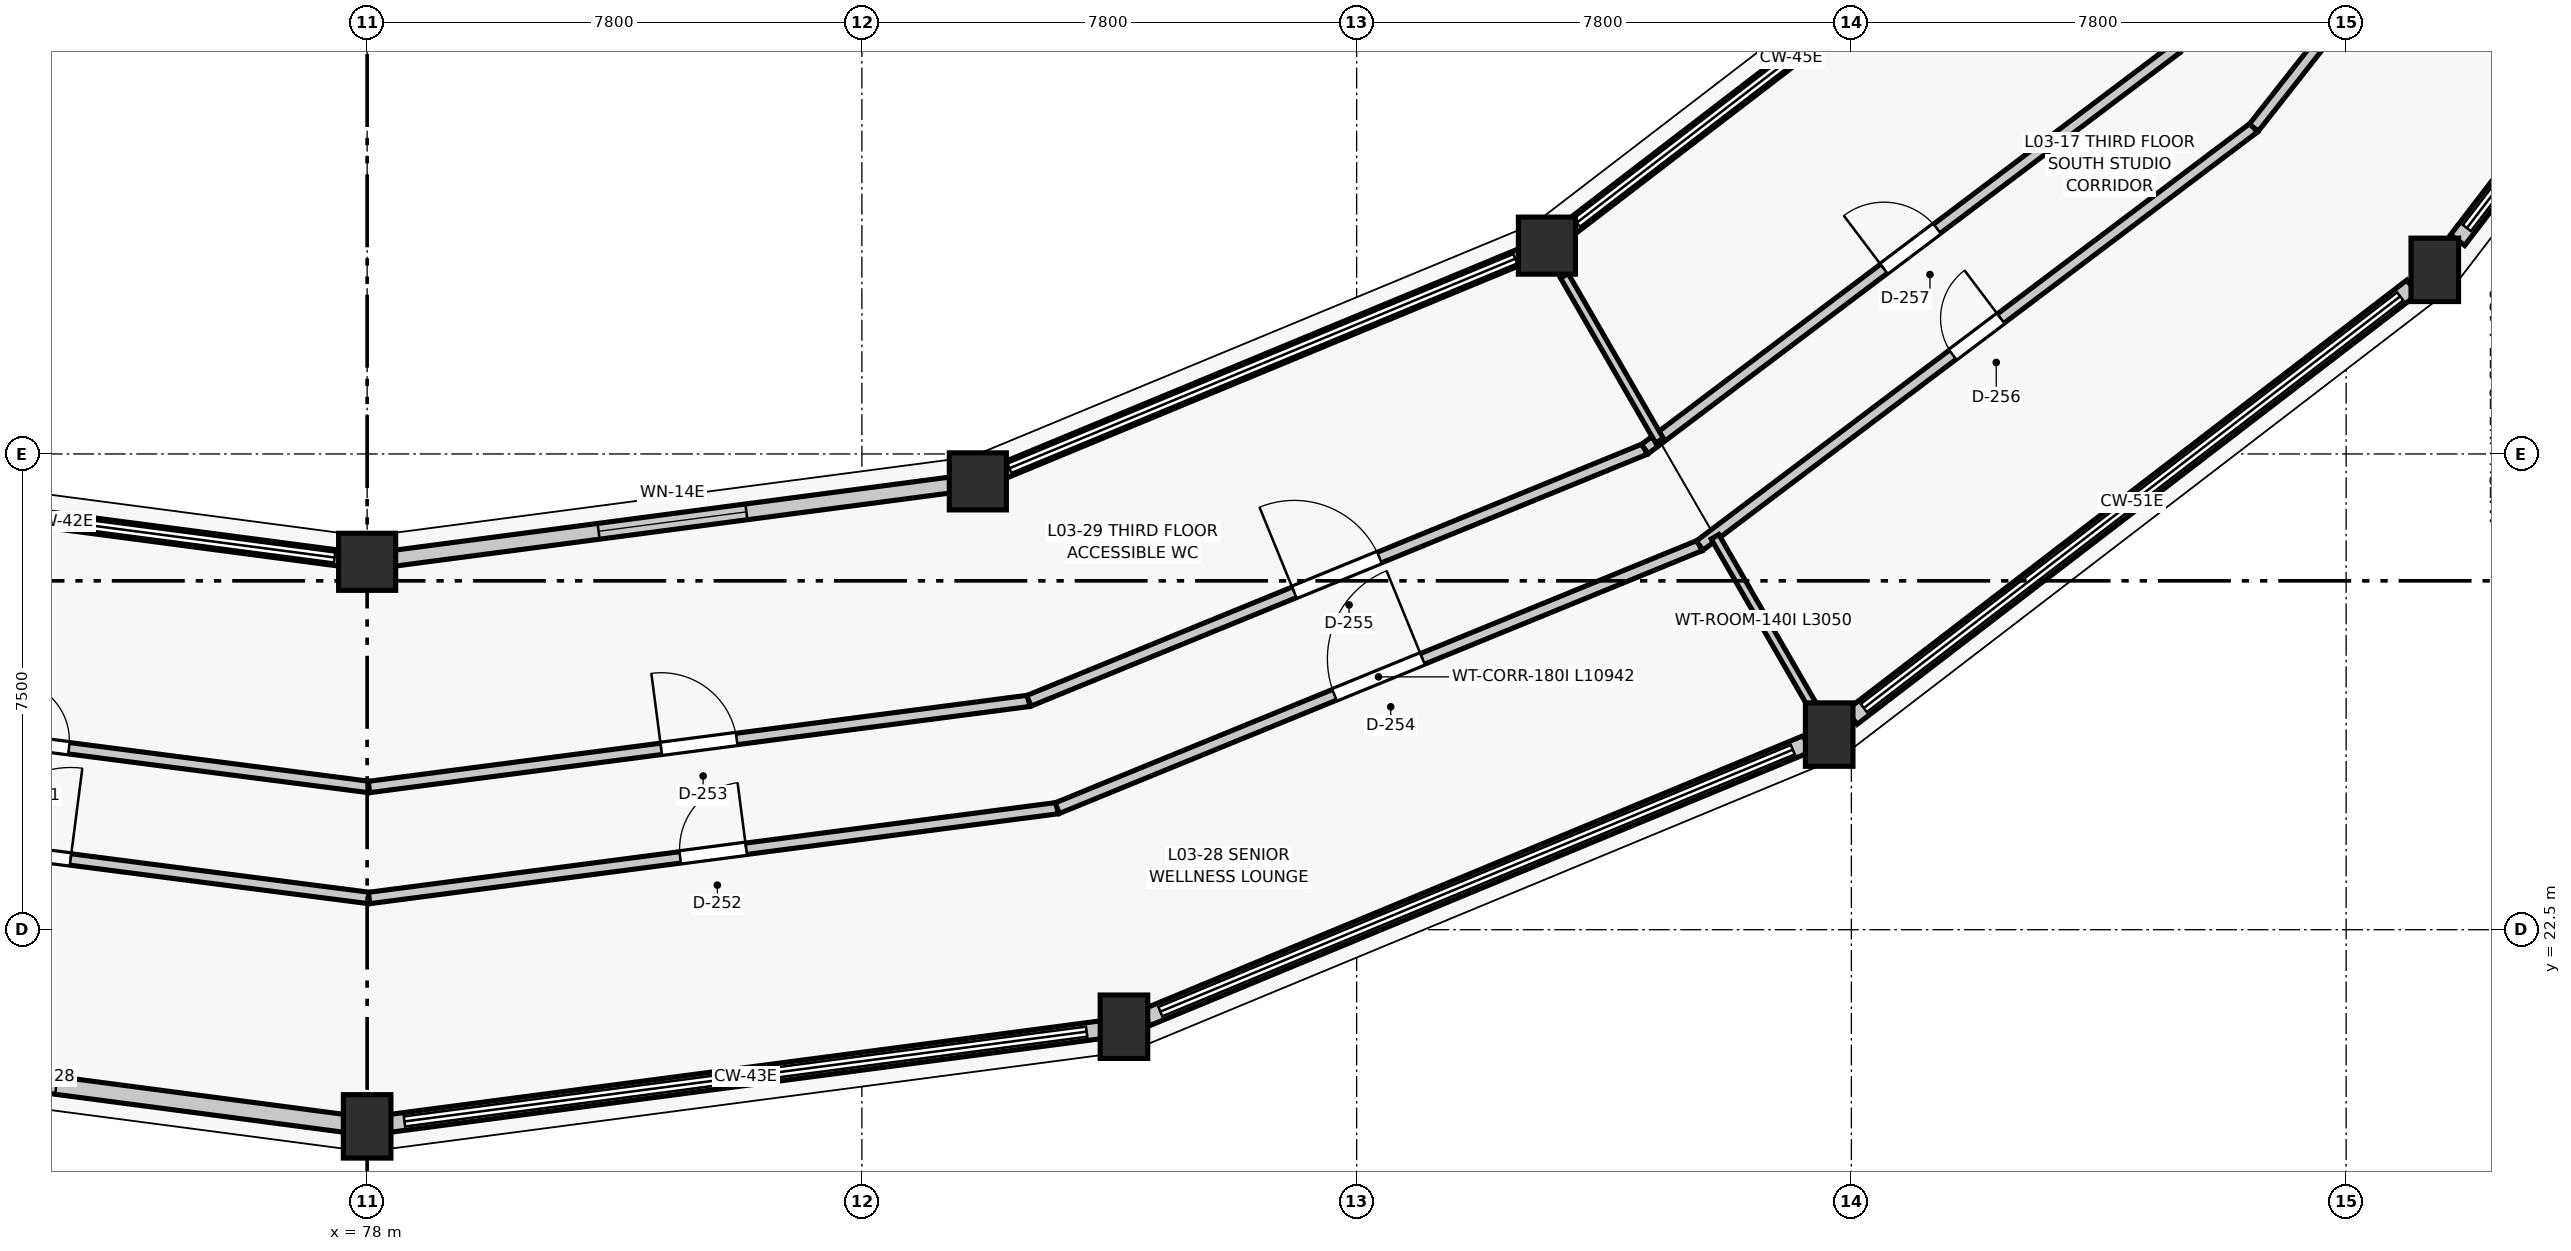
"""IFC4 building model, lengths in metres.
Left out: names, types, materials, properties, quantities, classifications, styles, units other than length and angle.
Written with IfcOpenShell. Run it as: python <this file> out.ifc"""

import sys

from ifc_helpers import new_model, si_unit, direction, frame, frame_2d, origin, origin_2d, place, context, subcontext, project, spatial, rectangle, circle, extrude, element, fill, save


model = new_model("IFC4")
c1 = context("Model", 3, precision=1e-05, world=origin(), true_north=direction((0.0, 1.0)))
c2 = subcontext(c1, "Body", "Model", "MODEL_VIEW")
j1 = project(units=[si_unit("LENGTHUNIT", "METRE"), si_unit("PLANEANGLEUNIT", "RADIAN")], contexts=[c1])
p1 = place(None, origin())
s1 = spatial("IfcSite", under=j1, at=p1, CompositionType="ELEMENT")
p2 = place(p1, origin())
s2 = spatial("IfcBuilding", under=s1, at=p2, CompositionType="ELEMENT")
p3 = place(p2, frame((0.0, 0.0, 12.6)))
s3 = spatial("IfcBuildingStorey", under=s2, at=p3, CompositionType="ELEMENT", Elevation=12.6)
p4 = place(p3, frame((87.628, 29.568, 0.0), z_axis=(0.0, 0.0, 1.0), x_axis=(1.0, 0.0, 0.0)))
e1 = element("IfcColumn", 1, at=p4, inside=s3, PredefinedType="COLUMN", context=c2, shape_type="SweptSolid", body=[
    extrude(circle(Radius=0.45, at=origin_2d()), origin(), (0.0, 0.0, 1.0), 3.9),
])
for number, where, z_axis, x_axis in (
    (2, (89.932, 20.971, 0.0), (0.0, 0.0, 1.0), (1.0, 0.0, 0.0)),
    (3, (78.0, 19.4, 0.0), (0.0, 0.0, 1.0), (1.0, 0.0, 0.0)),
):
    element("IfcColumn", number, at=place(p3, frame(where, z_axis=z_axis, x_axis=x_axis)), inside=s3, PredefinedType="COLUMN", context=c2, shape_type="SweptSolid", body=[
        extrude(rectangle(XDim=0.75, YDim=1.0, at=origin_2d()), origin(), (0.0, 0.0, 1.0), 3.9),
    ])
p5 = place(p3, frame((78.0, 28.3, 0.0), z_axis=(0.0, 0.0, 1.0), x_axis=(1.0, 0.0, 0.0)))
e4 = element("IfcColumn", 4, at=p5, inside=s3, PredefinedType="COLUMN", context=c2, shape_type="SweptSolid", body=[
    extrude(circle(Radius=0.45, at=origin_2d()), origin(), (0.0, 0.0, 1.0), 3.9),
])
p6 = place(p3, frame((101.05, 25.576, 0.0), z_axis=(0.0, 0.0, 1.0), x_axis=(1.0, 0.0, 0.0)))
e5 = element("IfcColumn", 5, at=p6, inside=s3, PredefinedType="COLUMN", context=c2, shape_type="SweptSolid", body=[
    extrude(rectangle(XDim=0.75, YDim=1.0, at=origin_2d()), origin(), (0.0, 0.0, 1.0), 3.9),
])
p7 = place(p3, frame((96.6, 33.284, 0.0), z_axis=(0.0, 0.0, 1.0), x_axis=(1.0, 0.0, 0.0)))
e6 = element("IfcColumn", 6, at=p7, inside=s3, PredefinedType="COLUMN", context=c2, shape_type="SweptSolid", body=[
    extrude(circle(Radius=0.45, at=origin_2d()), origin(), (0.0, 0.0, 1.0), 3.9),
])
p8 = place(p3, frame((110.598, 32.902, 0.0), z_axis=(0.0, 0.0, 1.0), x_axis=(1.0, 0.0, 0.0)))
e7 = element("IfcColumn", 7, at=p8, inside=s3, PredefinedType="COLUMN", context=c2, shape_type="SweptSolid", body=[
    extrude(rectangle(XDim=0.75, YDim=1.0, at=origin_2d()), origin(), (0.0, 0.0, 1.0), 3.9),
])
p9 = place(p3, frame((77.65, 19.446, 0.0), z_axis=(0.0, 0.0, 1.0), x_axis=(-0.991443215359, 0.130538694334, 0.0)))
e8 = element("IfcWall", 8, at=p9, inside=s3, PredefinedType="STANDARD", context=c2, shape_type="SweptSolid", body=[
    extrude(rectangle(XDim=11.328, YDim=0.28, at=frame_2d((5.664, 0.0))), origin(), (0.0, 0.0, 1.0), 2.805),
])
p10 = place(p9, frame((4.589, 0.0, 0.85)))
e9 = element("IfcOpeningElement", 9, at=p10, cuts=e8, PredefinedType="OPENING", context=c2, shape_type="SweptSolid", body=[
    extrude(rectangle(XDim=2.15, YDim=1.55, at=frame_2d((1.075, 0.775))), frame((0.0, 0.15, 0.0), z_axis=(0.0, -1.0, 0.0), x_axis=(1.0, 0.0, 0.0)), (0.0, 0.0, 1.0), 0.3),
])
p11 = place(p3, frame((68.647, 29.531, 0.0), z_axis=(0.0, 0.0, 1.0), x_axis=(0.991441766434, -0.130549698469, 0.0)))
e10 = element("IfcWall", 10, at=p11, inside=s3, PredefinedType="STANDARD", context=c2, shape_type="SweptSolid", body=[
    extrude(rectangle(XDim=9.156, YDim=0.25, at=frame_2d((4.578, 0.0))), origin(), (0.0, 0.0, 1.0), 0.82),
])
p12 = place(p3, frame((89.581, 20.925, 0.0), z_axis=(0.0, 0.0, 1.0), x_axis=(-0.991443215359, -0.130538694334, 0.0)))
e11 = element("IfcWall", 11, at=p12, inside=s3, PredefinedType="STANDARD", context=c2, shape_type="SweptSolid", body=[
    extrude(rectangle(XDim=11.328, YDim=0.28, at=frame_2d((5.664, 0.0))), origin(), (0.0, 0.0, 1.0), 0.82),
])
p13 = place(p3, frame((78.275, 28.336, 0.0), z_axis=(0.0, 0.0, 1.0), x_axis=(0.991441766434, 0.130549698469, 0.0)))
e12 = element("IfcWall", 12, at=p13, inside=s3, PredefinedType="STANDARD", context=c2, shape_type="SweptSolid", body=[
    extrude(rectangle(XDim=9.156, YDim=0.25, at=frame_2d((4.578, 0.0))), origin(), (0.0, 0.0, 1.0), 2.889),
])
p14 = place(p13, frame((3.403, 0.0, 0.85)))
e13 = element("IfcOpeningElement", 13, at=p14, cuts=e12, PredefinedType="OPENING", context=c2, shape_type="SweptSolid", body=[
    extrude(rectangle(XDim=2.35, YDim=1.55, at=frame_2d((1.175, 0.775))), frame((0.0, 0.135, 0.0), z_axis=(0.0, -1.0, 0.0), x_axis=(1.0, 0.0, 0.0)), (0.0, 0.0, 1.0), 0.27),
])
p15 = place(p3, frame((100.698, 25.43, 0.0), z_axis=(0.0, 0.0, 1.0), x_axis=(-0.923883530636, -0.382673779896, 0.0)))
e14 = element("IfcWall", 14, at=p15, inside=s3, PredefinedType="STANDARD", context=c2, shape_type="SweptSolid", body=[
    extrude(rectangle(XDim=11.272, YDim=0.28, at=frame_2d((5.636, 0.0))), origin(), (0.0, 0.0, 1.0), 0.82),
])
p16 = place(p3, frame((87.905, 29.682, 0.0), z_axis=(0.0, 0.0, 1.0), x_axis=(0.923880324771, 0.382681519675, 0.0)))
e15 = element("IfcWall", 15, at=p16, inside=s3, PredefinedType="STANDARD", context=c2, shape_type="SweptSolid", body=[
    extrude(rectangle(XDim=9.112, YDim=0.25, at=frame_2d((4.556, 0.0))), origin(), (0.0, 0.0, 1.0), 0.82),
])
p17 = place(p3, frame((110.242, 32.63, 0.0), z_axis=(0.0, 0.0, 1.0), x_axis=(-0.793342066679, -0.608776120785, 0.0)))
e16 = element("IfcWall", 16, at=p17, inside=s3, PredefinedType="STANDARD", context=c2, shape_type="SweptSolid", body=[
    extrude(rectangle(XDim=11.139, YDim=0.28, at=frame_2d((5.57, 0.0))), origin(), (0.0, 0.0, 1.0), 0.82),
])
p18 = place(p3, frame((96.88, 33.499, 0.0), z_axis=(0.0, 0.0, 1.0), x_axis=(0.793347085527, 0.608769580289, 0.0)))
e17 = element("IfcWall", 17, at=p18, inside=s3, PredefinedType="STANDARD", context=c2, shape_type="SweptSolid", body=[
    extrude(rectangle(XDim=9.005, YDim=0.25, at=frame_2d((4.502, 0.0))), origin(), (0.0, 0.0, 1.0), 0.82),
])
p19 = place(p3, frame((117.564, 41.981, 0.0), z_axis=(0.0, 0.0, 1.0), x_axis=(-0.608753590889, -0.79335935463, 0.0)))
e18 = element("IfcWall", 18, at=p19, inside=s3, PredefinedType="STANDARD", context=c2, shape_type="SweptSolid", body=[
    extrude(rectangle(XDim=10.852, YDim=0.28, at=frame_2d((5.426, 0.0))), origin(), (0.0, 0.0, 1.0), 0.82),
])
p20 = place(p3, frame((67.179, 24.4, 0.0), z_axis=(0.0, 0.0, 1.0), x_axis=(0.991775673997, -0.12798832942, 0.0)))
e19 = element("IfcWall", 19, at=p20, inside=s3, PredefinedType="PARTITIONING", context=c2, shape_type="SweptSolid", body=[
    extrude(rectangle(XDim=10.942, YDim=0.18, at=frame_2d((5.471, 0.0))), origin(), (0.0, 0.0, 1.0), 3.595),
])
p21 = place(p20, frame((4.746, 0.0, 0.0)))
e20 = element("IfcOpeningElement", 20, at=p21, cuts=e19, PredefinedType="OPENING", context=c2, shape_type="SweptSolid", body=[
    extrude(rectangle(XDim=1.45, YDim=2.2, at=frame_2d((0.725, 1.1))), frame((0.0, 0.1, 0.0), z_axis=(0.0, -1.0, 0.0), x_axis=(1.0, 0.0, 0.0)), (0.0, 0.0, 1.0), 0.2),
])
p22 = place(p3, frame((67.625, 26.093, 0.0), z_axis=(0.0, 0.0, 1.0), x_axis=(0.991771863005, -0.128017857155, 0.0)))
e21 = element("IfcWall", 21, at=p22, inside=s3, PredefinedType="PARTITIONING", context=c2, shape_type="SweptSolid", body=[
    extrude(rectangle(XDim=10.491, YDim=0.18, at=frame_2d((5.246, 0.0))), origin(), (0.0, 0.0, 1.0), 3.595),
])
p23 = place(p22, frame((4.771, 0.0, 0.0)))
e22 = element("IfcOpeningElement", 22, at=p23, cuts=e21, PredefinedType="OPENING", context=c2, shape_type="SweptSolid", body=[
    extrude(rectangle(XDim=0.95, YDim=2.1, at=frame_2d((0.475, 1.05))), frame((0.0, 0.1, 0.0), z_axis=(0.0, -1.0, 0.0), x_axis=(1.0, 0.0, 0.0)), (0.0, 0.0, 1.0), 0.2),
])
p24 = place(p3, frame((78.031, 23.0, 0.0), z_axis=(0.0, 0.0, 1.0), x_axis=(0.991587217042, 0.129440298973, 0.0)))
e23 = element("IfcWall", 23, at=p24, inside=s3, PredefinedType="PARTITIONING", context=c2, shape_type="SweptSolid", body=[
    extrude(rectangle(XDim=10.941, YDim=0.18, at=frame_2d((5.471, 0.0))), origin(), (0.0, 0.0, 1.0), 3.595),
])
p25 = place(p24, frame((4.946, 0.0, 0.0)))
e24 = element("IfcOpeningElement", 24, at=p25, cuts=e23, PredefinedType="OPENING", context=c2, shape_type="SweptSolid", body=[
    extrude(rectangle(XDim=1.05, YDim=2.1, at=frame_2d((0.525, 1.05))), frame((0.0, 0.1, 0.0), z_axis=(0.0, -1.0, 0.0), x_axis=(1.0, 0.0, 0.0)), (0.0, 0.0, 1.0), 0.2),
])
p26 = place(p3, frame((78.03, 24.75, 0.0), z_axis=(0.0, 0.0, 1.0), x_axis=(0.991587949115, 0.129434690753, 0.0)))
e25 = element("IfcWall", 25, at=p26, inside=s3, PredefinedType="PARTITIONING", context=c2, shape_type="SweptSolid", body=[
    extrude(rectangle(XDim=10.491, YDim=0.18, at=frame_2d((5.246, 0.0))), origin(), (0.0, 0.0, 1.0), 3.595),
])
p27 = place(p26, frame((4.646, 0.0, 0.0)))
e26 = element("IfcOpeningElement", 26, at=p27, cuts=e25, PredefinedType="OPENING", context=c2, shape_type="SweptSolid", body=[
    extrude(rectangle(XDim=1.2, YDim=2.15, at=frame_2d((0.6, 1.075))), frame((0.0, 0.1, 0.0), z_axis=(0.0, -1.0, 0.0), x_axis=(1.0, 0.0, 0.0)), (0.0, 0.0, 1.0), 0.2),
])
p28 = place(p3, frame((88.88, 24.416, 0.0), z_axis=(0.0, 0.0, 1.0), x_axis=(0.925676277966, 0.378316571685, 0.0)))
e27 = element("IfcWall", 27, at=p28, inside=s3, PredefinedType="PARTITIONING", context=c2, shape_type="SweptSolid", body=[
    extrude(rectangle(XDim=10.942, YDim=0.18, at=frame_2d((5.471, 0.0))), origin(), (0.0, 0.0, 1.0), 3.595),
])
p29 = place(p28, frame((4.721, 0.0, 0.0)))
e28 = element("IfcOpeningElement", 28, at=p29, cuts=e27, PredefinedType="OPENING", context=c2, shape_type="SweptSolid", body=[
    extrude(rectangle(XDim=1.5, YDim=2.15, at=frame_2d((0.75, 1.075))), frame((0.0, 0.1, 0.0), z_axis=(0.0, -1.0, 0.0), x_axis=(1.0, 0.0, 0.0)), (0.0, 0.0, 1.0), 0.2),
])
p30 = place(p3, frame((88.432, 26.108, 0.0), z_axis=(0.0, 0.0, 1.0), x_axis=(0.925672571616, 0.378325640364, 0.0)))
e29 = element("IfcWall", 29, at=p30, inside=s3, PredefinedType="PARTITIONING", context=c2, shape_type="SweptSolid", body=[
    extrude(rectangle(XDim=10.491, YDim=0.18, at=frame_2d((5.246, 0.0))), origin(), (0.0, 0.0, 1.0), 3.595),
])
p31 = place(p30, frame((4.521, 0.0, 0.0)))
e30 = element("IfcOpeningElement", 30, at=p31, cuts=e29, PredefinedType="OPENING", context=c2, shape_type="SweptSolid", body=[
    extrude(rectangle(XDim=1.45, YDim=2.2, at=frame_2d((0.725, 1.1))), frame((0.0, 0.1, 0.0), z_axis=(0.0, -1.0, 0.0), x_axis=(1.0, 0.0, 0.0)), (0.0, 0.0, 1.0), 0.2),
])
p32 = place(p3, frame((99.009, 28.556, 0.0), z_axis=(0.0, 0.0, 1.0), x_axis=(0.798409350031, 0.602115030358, 0.0)))
e31 = element("IfcWall", 31, at=p32, inside=s3, PredefinedType="PARTITIONING", context=c2, shape_type="SweptSolid", body=[
    extrude(rectangle(XDim=10.941, YDim=0.18, at=frame_2d((5.471, 0.0))), origin(), (0.0, 0.0, 1.0), 3.595),
])
p33 = place(p32, frame((4.996, 0.0, 0.0)))
e32 = element("IfcOpeningElement", 32, at=p33, cuts=e31, PredefinedType="OPENING", context=c2, shape_type="SweptSolid", body=[
    extrude(rectangle(XDim=0.95, YDim=2.1, at=frame_2d((0.475, 1.05))), frame((0.0, 0.1, 0.0), z_axis=(0.0, -1.0, 0.0), x_axis=(1.0, 0.0, 0.0)), (0.0, 0.0, 1.0), 0.2),
])
p34 = place(p3, frame((98.144, 30.077, 0.0), z_axis=(0.0, 0.0, 1.0), x_axis=(0.798419431093, 0.602101662557, 0.0)))
e33 = element("IfcWall", 33, at=p34, inside=s3, PredefinedType="PARTITIONING", context=c2, shape_type="SweptSolid", body=[
    extrude(rectangle(XDim=10.491, YDim=0.18, at=frame_2d((5.246, 0.0))), origin(), (0.0, 0.0, 1.0), 3.595),
])
p35 = place(p34, frame((4.72, 0.0, 0.0)))
e34 = element("IfcOpeningElement", 34, at=p35, cuts=e33, PredefinedType="OPENING", context=c2, shape_type="SweptSolid", body=[
    extrude(rectangle(XDim=1.05, YDim=2.1, at=frame_2d((0.525, 1.05))), frame((0.0, 0.1, 0.0), z_axis=(0.0, -1.0, 0.0), x_axis=(1.0, 0.0, 0.0)), (0.0, 0.0, 1.0), 0.2),
])
p36 = place(p3, frame((107.744, 35.144, 0.0), z_axis=(0.0, 0.0, 1.0), x_axis=(0.618252095573, 0.785979863813, 0.0)))
e35 = element("IfcWall", 35, at=p36, inside=s3, PredefinedType="PARTITIONING", context=c2, shape_type="SweptSolid", body=[
    extrude(rectangle(XDim=10.942, YDim=0.18, at=frame_2d((5.471, 0.0))), origin(), (0.0, 0.0, 1.0), 3.595),
])
p37 = place(p36, frame((4.871, 0.0, 0.0)))
e36 = element("IfcOpeningElement", 36, at=p37, cuts=e35, PredefinedType="OPENING", context=c2, shape_type="SweptSolid", body=[
    extrude(rectangle(XDim=1.2, YDim=2.15, at=frame_2d((0.6, 1.075))), frame((0.0, 0.1, 0.0), z_axis=(0.0, -1.0, 0.0), x_axis=(1.0, 0.0, 0.0)), (0.0, 0.0, 1.0), 0.2),
])
p38 = place(p3, frame((99.25, 28.694, 0.0), z_axis=(0.0, 0.0, 1.0), x_axis=(0.499978833458, -0.866037623948, 0.0)))
e37 = element("IfcWall", 37, at=p38, inside=s3, PredefinedType="PARTITIONING", context=c2, shape_type="SweptSolid", body=[
    extrude(rectangle(XDim=3.05, YDim=0.14, at=frame_2d((1.525, 0.0))), origin(), (0.0, 0.0, 1.0), 2.957),
])
p39 = place(p3, frame((96.875, 32.808, 0.0), z_axis=(0.0, 0.0, 1.0), x_axis=(0.499990139034, -0.866031096941, 0.0)))
e38 = element("IfcWall", 38, at=p39, inside=s3, PredefinedType="PARTITIONING", context=c2, shape_type="SweptSolid", body=[
    extrude(rectangle(XDim=3.0, YDim=0.14, at=frame_2d((1.5, 0.0))), origin(), (0.0, 0.0, 1.0), 2.957),
])
p40 = place(p10, origin())
e39 = element("IfcWindow", 39, at=p40, inside=s3, PartitioningType="SINGLE_PANEL", PredefinedType="WINDOW", context=c2, shape_type="SweptSolid", body=[
    extrude(rectangle(XDim=2.15, YDim=1.55, at=frame_2d((1.075, 0.775))), frame((0.0, 0.03, 0.0), z_axis=(0.0, -1.0, 0.0), x_axis=(1.0, 0.0, 0.0)), (0.0, 0.0, 1.0), 0.06),
])
fill(e9, e39)
p41 = place(p14, origin())
e40 = element("IfcWindow", 40, at=p41, inside=s3, PartitioningType="SINGLE_PANEL", PredefinedType="WINDOW", context=c2, shape_type="SweptSolid", body=[
    extrude(rectangle(XDim=2.35, YDim=1.55, at=frame_2d((1.175, 0.775))), frame((0.0, 0.03, 0.0), z_axis=(0.0, -1.0, 0.0), x_axis=(1.0, 0.0, 0.0)), (0.0, 0.0, 1.0), 0.06),
])
fill(e13, e40)
p42 = place(p21, origin())
e41 = element("IfcDoor", 41, at=p42, inside=s3, OperationType="SINGLE_SWING_RIGHT", PredefinedType="DOOR", context=c2, shape_type="SweptSolid", body=[
    extrude(rectangle(XDim=1.45, YDim=2.2, at=frame_2d((0.725, 1.1))), frame((0.0, 0.025, 0.0), z_axis=(0.0, -1.0, 0.0), x_axis=(1.0, 0.0, 0.0)), (0.0, 0.0, 1.0), 0.05),
])
fill(e20, e41)
p43 = place(p23, origin())
e42 = element("IfcDoor", 42, at=p43, inside=s3, OperationType="SINGLE_SWING_LEFT", PredefinedType="DOOR", context=c2, shape_type="SweptSolid", body=[
    extrude(rectangle(XDim=0.95, YDim=2.1, at=frame_2d((0.475, 1.05))), frame((0.0, 0.025, 0.0), z_axis=(0.0, -1.0, 0.0), x_axis=(1.0, 0.0, 0.0)), (0.0, 0.0, 1.0), 0.05),
])
fill(e22, e42)
p44 = place(p25, origin())
e43 = element("IfcDoor", 43, at=p44, inside=s3, OperationType="SINGLE_SWING_RIGHT", PredefinedType="DOOR", context=c2, shape_type="SweptSolid", body=[
    extrude(rectangle(XDim=1.05, YDim=2.1, at=frame_2d((0.525, 1.05))), frame((0.0, 0.025, 0.0), z_axis=(0.0, -1.0, 0.0), x_axis=(1.0, 0.0, 0.0)), (0.0, 0.0, 1.0), 0.05),
])
fill(e24, e43)
p45 = place(p27, origin())
e44 = element("IfcDoor", 44, at=p45, inside=s3, OperationType="SINGLE_SWING_LEFT", PredefinedType="DOOR", context=c2, shape_type="SweptSolid", body=[
    extrude(rectangle(XDim=1.2, YDim=2.15, at=frame_2d((0.6, 1.075))), frame((0.0, 0.025, 0.0), z_axis=(0.0, -1.0, 0.0), x_axis=(1.0, 0.0, 0.0)), (0.0, 0.0, 1.0), 0.05),
])
fill(e26, e44)
p46 = place(p29, origin())
e45 = element("IfcDoor", 45, at=p46, inside=s3, OperationType="SINGLE_SWING_RIGHT", PredefinedType="DOOR", context=c2, shape_type="SweptSolid", body=[
    extrude(rectangle(XDim=1.5, YDim=2.15, at=frame_2d((0.75, 1.075))), frame((0.0, 0.025, 0.0), z_axis=(0.0, -1.0, 0.0), x_axis=(1.0, 0.0, 0.0)), (0.0, 0.0, 1.0), 0.05),
])
fill(e28, e45)
p47 = place(p31, origin())
e46 = element("IfcDoor", 46, at=p47, inside=s3, OperationType="SINGLE_SWING_LEFT", PredefinedType="DOOR", context=c2, shape_type="SweptSolid", body=[
    extrude(rectangle(XDim=1.45, YDim=2.2, at=frame_2d((0.725, 1.1))), frame((0.0, 0.025, 0.0), z_axis=(0.0, -1.0, 0.0), x_axis=(1.0, 0.0, 0.0)), (0.0, 0.0, 1.0), 0.05),
])
fill(e30, e46)
p48 = place(p33, origin())
e47 = element("IfcDoor", 47, at=p48, inside=s3, OperationType="SINGLE_SWING_RIGHT", PredefinedType="DOOR", context=c2, shape_type="SweptSolid", body=[
    extrude(rectangle(XDim=0.95, YDim=2.1, at=frame_2d((0.475, 1.05))), frame((0.0, 0.025, 0.0), z_axis=(0.0, -1.0, 0.0), x_axis=(1.0, 0.0, 0.0)), (0.0, 0.0, 1.0), 0.05),
])
fill(e32, e47)
p49 = place(p35, origin())
e48 = element("IfcDoor", 48, at=p49, inside=s3, OperationType="SINGLE_SWING_LEFT", PredefinedType="DOOR", context=c2, shape_type="SweptSolid", body=[
    extrude(rectangle(XDim=1.05, YDim=2.1, at=frame_2d((0.525, 1.05))), frame((0.0, 0.025, 0.0), z_axis=(0.0, -1.0, 0.0), x_axis=(1.0, 0.0, 0.0)), (0.0, 0.0, 1.0), 0.05),
])
fill(e34, e48)
save(model, sys.argv[1])
